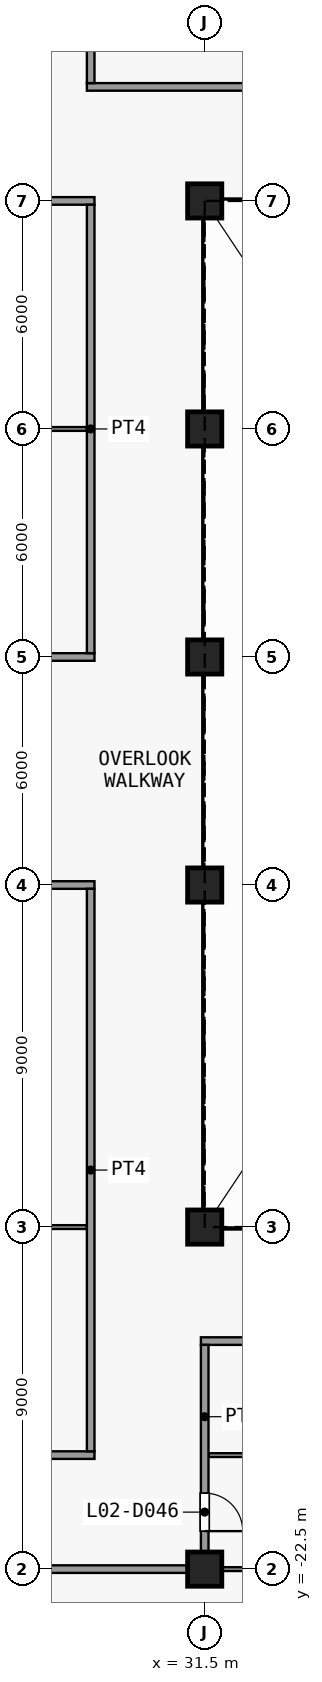
"""IFC4 building model, lengths in metres.
Left out: names, types, materials, properties, quantities, classifications, styles, units other than length and angle.
Written with IfcOpenShell. Run it as: python <this file> out.ifc"""

import sys

from ifc_helpers import new_model, si_unit, direction, frame, frame_2d, origin, origin_2d, place, context, subcontext, project, spatial, rectangle, extrude, element, fill, save


model = new_model("IFC4")
c1 = context("Model", 3, precision=1e-05, world=origin(), true_north=direction((0.0, 1.0)))
c2 = subcontext(c1, "Body", "Model", "MODEL_VIEW")
j1 = project(units=[si_unit("LENGTHUNIT", "METRE"), si_unit("PLANEANGLEUNIT", "RADIAN")], contexts=[c1])
p1 = place(None, origin())
s1 = spatial("IfcSite", under=j1, at=p1, CompositionType="ELEMENT")
p2 = place(p1, origin())
s2 = spatial("IfcBuilding", under=s1, at=p2, CompositionType="ELEMENT")
p3 = place(p2, frame((0.0, 0.0, 13.5)))
s3 = spatial("IfcBuildingStorey", under=s2, at=p3, CompositionType="ELEMENT", Elevation=13.5)
for number, where, z_axis, x_axis in (
    (1, (31.5, -22.5, 0.0), (0.0, 0.0, 1.0), (1.0, 0.0, 0.0)),
    (2, (31.5, -13.5, 0.0), (0.0, 0.0, 1.0), (1.0, 0.0, 0.0)),
    (3, (31.5, -4.5, 0.0), (0.0, 0.0, 1.0), (1.0, 0.0, 0.0)),
    (4, (31.5, 1.5, 0.0), (0.0, 0.0, 1.0), (1.0, 0.0, 0.0)),
    (5, (31.5, 7.5, 0.0), (0.0, 0.0, 1.0), (1.0, 0.0, 0.0)),
    (6, (31.5, 13.5, 0.0), (0.0, 0.0, 1.0), (1.0, 0.0, 0.0)),
):
    element("IfcColumn", number, at=place(p3, frame(where, z_axis=z_axis, x_axis=x_axis)), inside=s3, PredefinedType="COLUMN", context=c2, shape_type="SweptSolid", body=[
        extrude(rectangle(XDim=0.9, YDim=0.9, at=origin_2d()), origin(), (0.0, 0.0, 1.0), 5.0),
    ])
p4 = place(p3, frame((17.4, -22.5, 0.0), z_axis=(0.0, 0.0, 1.0), x_axis=(1.0, 0.0, 0.0)))
e7 = element("IfcWall", 7, at=p4, inside=s3, PredefinedType="PARTITIONING", context=c2, shape_type="SweptSolid", body=[
    extrude(rectangle(XDim=14.1, YDim=0.2, at=frame_2d((7.05, 0.0))), origin(), (0.0, 0.0, 1.0), 4.65),
])
p5 = place(p3, frame((31.5, -22.5, 0.0), z_axis=(0.0, 0.0, 1.0), x_axis=(1.0, 0.0, 0.0)))
e8 = element("IfcWall", 8, at=p5, inside=s3, PredefinedType="PARTITIONING", context=c2, shape_type="SweptSolid", body=[
    extrude(rectangle(XDim=20.95, YDim=0.1, at=frame_2d((10.475, 0.0))), origin(), (0.0, 0.0, 1.0), 4.65),
])
p6 = place(p3, frame((13.5, -19.5, 0.0), z_axis=(0.0, 0.0, 1.0), x_axis=(1.0, 0.0, 0.0)))
e9 = element("IfcWall", 9, at=p6, inside=s3, PredefinedType="PARTITIONING", context=c2, shape_type="SweptSolid", body=[
    extrude(rectangle(XDim=15.1, YDim=0.2, at=frame_2d((7.55, 0.0))), origin(), (0.0, 0.0, 1.0), 4.65),
])
p7 = place(p6, frame((7.0, 0.0, 0.0)))
e10 = element("IfcOpeningElement", 10, at=p7, cuts=e9, PredefinedType="OPENING", context=c2, shape_type="SweptSolid", body=[
    extrude(rectangle(XDim=1.0, YDim=2.1, at=frame_2d((0.5, 1.05))), frame((0.0, 0.11, 0.0), z_axis=(0.0, -1.0, 0.0), x_axis=(1.0, 0.0, 0.0)), (0.0, 0.0, 1.0), 0.22),
])
p8 = place(p3, frame((31.6, -19.5, 0.0), z_axis=(0.0, 0.0, 1.0), x_axis=(1.0, 0.0, 0.0)))
e11 = element("IfcWall", 11, at=p8, inside=s3, PredefinedType="PARTITIONING", context=c2, shape_type="SweptSolid", body=[
    extrude(rectangle(XDim=20.85, YDim=0.1, at=frame_2d((10.425, 0.0))), origin(), (0.0, 0.0, 1.0), 4.65),
])
p9 = place(p3, frame((31.4, -16.5, 0.0), z_axis=(0.0, 0.0, 1.0), x_axis=(1.0, 0.0, 0.0)))
e12 = element("IfcWall", 12, at=p9, inside=s3, PredefinedType="PARTITIONING", context=c2, shape_type="SweptSolid", body=[
    extrude(rectangle(XDim=21.0, YDim=0.2, at=frame_2d((10.5, 0.0))), origin(), (0.0, 0.0, 1.0), 4.65),
])
p10 = place(p9, frame((3.2, 0.0, 0.0)))
e13 = element("IfcOpeningElement", 13, at=p10, cuts=e12, PredefinedType="OPENING", context=c2, shape_type="SweptSolid", body=[
    extrude(rectangle(XDim=1.0, YDim=2.1, at=frame_2d((0.5, 1.05))), frame((0.0, 0.11, 0.0), z_axis=(0.0, -1.0, 0.0), x_axis=(1.0, 0.0, 0.0)), (0.0, 0.0, 1.0), 0.22),
])
p11 = place(p9, frame((14.0, 0.0, 0.0)))
e14 = element("IfcOpeningElement", 14, at=p11, cuts=e12, PredefinedType="OPENING", context=c2, shape_type="SweptSolid", body=[
    extrude(rectangle(XDim=1.0, YDim=2.1, at=frame_2d((0.5, 1.05))), frame((0.0, 0.11, 0.0), z_axis=(0.0, -1.0, 0.0), x_axis=(1.0, 0.0, 0.0)), (0.0, 0.0, 1.0), 0.22),
])
p12 = place(p3, frame((13.5, -13.5, 0.0), z_axis=(0.0, 0.0, 1.0), x_axis=(1.0, 0.0, 0.0)))
e15 = element("IfcWall", 15, at=p12, inside=s3, PredefinedType="PARTITIONING", context=c2, shape_type="SweptSolid", body=[
    extrude(rectangle(XDim=14.9, YDim=0.1, at=frame_2d((7.45, 0.0))), origin(), (0.0, 0.0, 1.0), 4.65),
])
p13 = place(p3, frame((13.4, -4.5, 0.0), z_axis=(0.0, 0.0, 1.0), x_axis=(1.0, 0.0, 0.0)))
e16 = element("IfcWall", 16, at=p13, inside=s3, PredefinedType="PARTITIONING", context=c2, shape_type="SweptSolid", body=[
    extrude(rectangle(XDim=15.2, YDim=0.2, at=frame_2d((7.6, 0.0))), origin(), (0.0, 0.0, 1.0), 4.65),
])
p14 = place(p13, frame((7.1, 0.0, 0.0)))
e17 = element("IfcOpeningElement", 17, at=p14, cuts=e16, PredefinedType="OPENING", context=c2, shape_type="SweptSolid", body=[
    extrude(rectangle(XDim=1.0, YDim=2.1, at=frame_2d((0.5, 1.05))), frame((0.0, 0.11, 0.0), z_axis=(0.0, -1.0, 0.0), x_axis=(1.0, 0.0, 0.0)), (0.0, 0.0, 1.0), 0.22),
])
p15 = place(p3, frame((20.3, 1.5, 0.0), z_axis=(0.0, 0.0, 1.0), x_axis=(1.0, 0.0, 0.0)))
e18 = element("IfcWall", 18, at=p15, inside=s3, PredefinedType="PARTITIONING", context=c2, shape_type="SweptSolid", body=[
    extrude(rectangle(XDim=8.3, YDim=0.2, at=frame_2d((4.15, 0.0))), origin(), (0.0, 0.0, 1.0), 4.65),
])
p16 = place(p15, frame((3.7, 0.0, 0.0)))
e19 = element("IfcOpeningElement", 19, at=p16, cuts=e18, PredefinedType="OPENING", context=c2, shape_type="SweptSolid", body=[
    extrude(rectangle(XDim=1.0, YDim=2.1, at=frame_2d((0.5, 1.05))), frame((0.0, 0.11, 0.0), z_axis=(0.0, -1.0, 0.0), x_axis=(1.0, 0.0, 0.0)), (0.0, 0.0, 1.0), 0.22),
])
p17 = place(p3, frame((20.5, 7.5, 0.0), z_axis=(0.0, 0.0, 1.0), x_axis=(1.0, 0.0, 0.0)))
e20 = element("IfcWall", 20, at=p17, inside=s3, PredefinedType="PARTITIONING", context=c2, shape_type="SweptSolid", body=[
    extrude(rectangle(XDim=7.9, YDim=0.1, at=frame_2d((3.95, 0.0))), origin(), (0.0, 0.0, 1.0), 4.65),
])
p18 = place(p3, frame((20.3, 13.5, 0.0), z_axis=(0.0, 0.0, 1.0), x_axis=(1.0, 0.0, 0.0)))
e21 = element("IfcWall", 21, at=p18, inside=s3, PredefinedType="PARTITIONING", context=c2, shape_type="SweptSolid", body=[
    extrude(rectangle(XDim=8.3, YDim=0.2, at=frame_2d((4.15, 0.0))), origin(), (0.0, 0.0, 1.0), 4.65),
])
p19 = place(p18, frame((3.7, 0.0, 0.0)))
e22 = element("IfcOpeningElement", 22, at=p19, cuts=e21, PredefinedType="OPENING", context=c2, shape_type="SweptSolid", body=[
    extrude(rectangle(XDim=1.0, YDim=2.1, at=frame_2d((0.5, 1.05))), frame((0.0, 0.11, 0.0), z_axis=(0.0, -1.0, 0.0), x_axis=(1.0, 0.0, 0.0)), (0.0, 0.0, 1.0), 0.22),
])
p20 = place(p3, frame((28.4, 16.5, 0.0), z_axis=(0.0, 0.0, 1.0), x_axis=(1.0, 0.0, 0.0)))
e23 = element("IfcWall", 23, at=p20, inside=s3, PredefinedType="PARTITIONING", context=c2, shape_type="SweptSolid", body=[
    extrude(rectangle(XDim=24.2, YDim=0.2, at=frame_2d((12.1, 0.0))), origin(), (0.0, 0.0, 1.0), 4.65),
])
p21 = place(p20, frame((6.2, 0.0, 0.0)))
e24 = element("IfcOpeningElement", 24, at=p21, cuts=e23, PredefinedType="OPENING", context=c2, shape_type="SweptSolid", body=[
    extrude(rectangle(XDim=1.0, YDim=2.1, at=frame_2d((0.5, 1.05))), frame((0.0, 0.11, 0.0), z_axis=(0.0, -1.0, 0.0), x_axis=(1.0, 0.0, 0.0)), (0.0, 0.0, 1.0), 0.22),
])
p22 = place(p20, frame((17.0, 0.0, 0.0)))
e25 = element("IfcOpeningElement", 25, at=p22, cuts=e23, PredefinedType="OPENING", context=c2, shape_type="SweptSolid", body=[
    extrude(rectangle(XDim=1.0, YDim=2.1, at=frame_2d((0.5, 1.05))), frame((0.0, 0.11, 0.0), z_axis=(0.0, -1.0, 0.0), x_axis=(1.0, 0.0, 0.0)), (0.0, 0.0, 1.0), 0.22),
])
p23 = place(p3, frame((28.5, -19.4, 0.0), z_axis=(0.0, 0.0, 1.0), x_axis=(0.0, 1.0, 0.0)))
e26 = element("IfcWall", 26, at=p23, inside=s3, PredefinedType="PARTITIONING", context=c2, shape_type="SweptSolid", body=[
    extrude(rectangle(XDim=14.8, YDim=0.2, at=frame_2d((7.4, 0.0))), origin(), (0.0, 0.0, 1.0), 4.65),
])
p24 = place(p3, frame((28.5, 1.6, 0.0), z_axis=(0.0, 0.0, 1.0), x_axis=(0.0, 1.0, 0.0)))
e27 = element("IfcWall", 27, at=p24, inside=s3, PredefinedType="PARTITIONING", context=c2, shape_type="SweptSolid", body=[
    extrude(rectangle(XDim=11.8, YDim=0.2, at=frame_2d((5.9, 0.0))), origin(), (0.0, 0.0, 1.0), 4.65),
])
p25 = place(p3, frame((28.5, 16.6, 0.0), z_axis=(0.0, 0.0, 1.0), x_axis=(0.0, 1.0, 0.0)))
e28 = element("IfcWall", 28, at=p25, inside=s3, PredefinedType="PARTITIONING", context=c2, shape_type="SweptSolid", body=[
    extrude(rectangle(XDim=2.8, YDim=0.2, at=frame_2d((1.4, 0.0))), origin(), (0.0, 0.0, 1.0), 4.65),
])
p26 = place(p3, frame((31.5, -22.4, 0.0), z_axis=(0.0, 0.0, 1.0), x_axis=(0.0, 1.0, 0.0)))
e29 = element("IfcWall", 29, at=p26, inside=s3, PredefinedType="PARTITIONING", context=c2, shape_type="SweptSolid", body=[
    extrude(rectangle(XDim=5.8, YDim=0.2, at=frame_2d((2.9, 0.0))), origin(), (0.0, 0.0, 1.0), 4.65),
])
p27 = place(p26, frame((0.9, 0.0, 0.0)))
e30 = element("IfcOpeningElement", 30, at=p27, cuts=e29, PredefinedType="OPENING", context=c2, shape_type="SweptSolid", body=[
    extrude(rectangle(XDim=1.0, YDim=2.1, at=frame_2d((0.5, 1.05))), frame((0.0, 0.11, 0.0), z_axis=(0.0, -1.0, 0.0), x_axis=(1.0, 0.0, 0.0)), (0.0, 0.0, 1.0), 0.22),
])
p28 = place(p27, origin())
e31 = element("IfcDoor", 31, at=p28, inside=s3, OperationType="SINGLE_SWING_LEFT", PredefinedType="DOOR", context=c2, shape_type="SweptSolid", body=[
    extrude(rectangle(XDim=1.0, YDim=2.1, at=frame_2d((0.5, 1.05))), frame((0.0, 0.025, 0.0), z_axis=(0.0, -1.0, 0.0), x_axis=(1.0, 0.0, 0.0)), (0.0, 0.0, 1.0), 0.05),
])
fill(e30, e31)
save(model, sys.argv[1])
